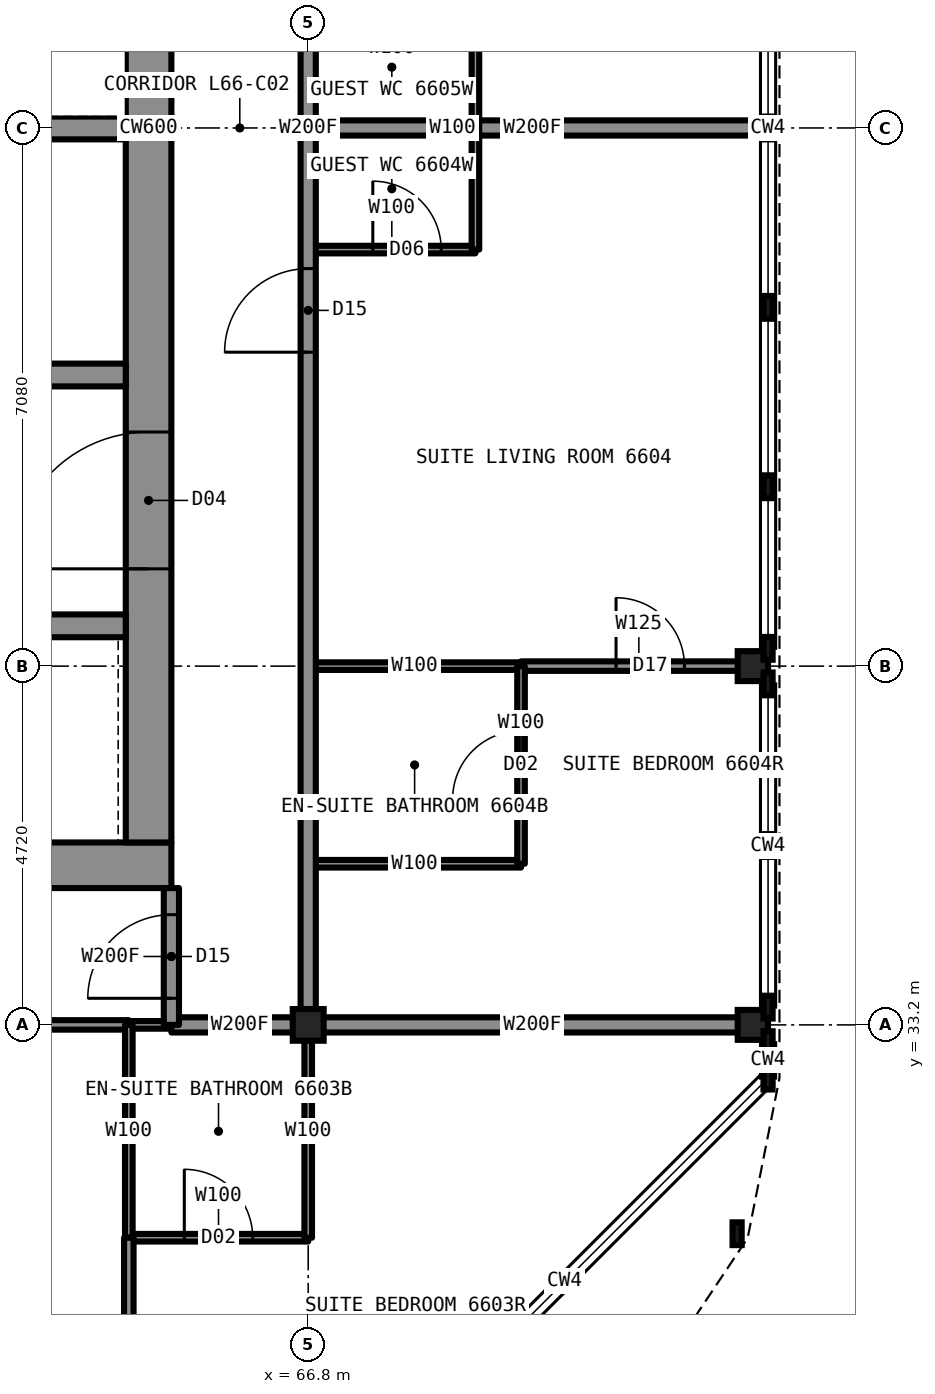
"""IFC4 building model, lengths in metres.
Left out: names, types, materials, properties, quantities, classifications, styles, units other than length and angle.
Written with IfcOpenShell. Run it as: python <this file> out.ifc"""

import sys

from ifc_helpers import new_model, si_unit, direction, frame, frame_2d, origin, origin_2d, place, context, subcontext, project, spatial, rectangle, i_section, extrude, element, fill, save


model = new_model("IFC4")
c1 = context("Model", 3, precision=1e-05, world=origin(), true_north=direction((0.0, 1.0)))
c2 = subcontext(c1, "Body", "Model", "MODEL_VIEW")
j1 = project(units=[si_unit("LENGTHUNIT", "METRE"), si_unit("PLANEANGLEUNIT", "RADIAN")], contexts=[c1])
p1 = place(None, origin())
s1 = spatial("IfcSite", under=j1, at=p1, CompositionType="ELEMENT")
p2 = place(p1, origin())
s2 = spatial("IfcBuilding", under=s1, at=p2, CompositionType="ELEMENT")
p3 = place(p2, frame((0.0, 0.0, 237.2)))
s3 = spatial("IfcBuildingStorey", under=s2, at=p3, CompositionType="ELEMENT", Elevation=237.2)
for number, where, z_axis, x_axis in (
    (1, (72.65, 33.2, 0.0), (0.0, 0.0, 1.0), (1.0, 0.0, 0.0)),
    (2, (72.65, 37.92, 0.0), (0.0, 0.0, 1.0), (1.0, 0.0, 0.0)),
):
    element("IfcColumn", number, at=place(p3, frame(where, z_axis=z_axis, x_axis=x_axis)), inside=s3, PredefinedType="COLUMN", context=c2, shape_type="SweptSolid", body=[
        extrude(i_section(OverallWidth=0.399, OverallDepth=0.394, WebThickness=0.023, FlangeThickness=0.037, at=origin_2d()), origin(), (0.0, 0.0, 1.0), 3.5),
    ])
p4 = place(p3, frame((66.8, 33.2, 0.0), z_axis=(0.0, 0.0, 1.0), x_axis=(1.0, 0.0, 0.0)))
e3 = element("IfcColumn", 3, at=p4, inside=s3, PredefinedType="COLUMN", context=c2, shape_type="SweptSolid", body=[
    extrude(i_section(OverallWidth=0.406, OverallDepth=0.417, WebThickness=0.03, FlangeThickness=0.048, at=origin_2d()), origin(), (0.0, 0.0, 1.0), 3.5),
])
p5 = place(p3, frame((45.0, 35.3, 0.0), z_axis=(0.0, 0.0, 1.0), x_axis=(1.0, 0.0, 0.0)))
e4 = element("IfcWall", 4, at=p5, inside=s3, PredefinedType="SHEAR", context=c2, shape_type="SweptSolid", body=[
    extrude(rectangle(XDim=20.0, YDim=0.6, at=frame_2d((10.0, 0.0))), origin(), (0.0, 0.0, 1.0), 3.5),
])
p6 = place(p3, frame((64.7, 35.6, 0.0), z_axis=(0.0, 0.0, 1.0), x_axis=(0.0, 1.0, 0.0)))
e5 = element("IfcWall", 5, at=p6, inside=s3, PredefinedType="SHEAR", context=c2, shape_type="SweptSolid", body=[
    extrude(rectangle(XDim=18.8, YDim=0.6, at=frame_2d((9.4, 0.0))), origin(), (0.0, 0.0, 1.0), 3.5),
])
p7 = place(p6, frame((13.4, 0.0, 0.0)))
e6 = element("IfcOpeningElement", 6, at=p7, cuts=e5, PredefinedType="OPENING", context=c2, shape_type="SweptSolid", body=[
    extrude(rectangle(XDim=1.8, YDim=2.2, at=frame_2d((0.9, 1.1))), frame((0.0, 0.31, 0.0), z_axis=(0.0, -1.0, 0.0), x_axis=(1.0, 0.0, 0.0)), (0.0, 0.0, 1.0), 0.62),
])
p8 = place(p6, frame((3.6, 0.0, 0.0)))
e7 = element("IfcOpeningElement", 7, at=p8, cuts=e5, PredefinedType="OPENING", context=c2, shape_type="SweptSolid", body=[
    extrude(rectangle(XDim=1.8, YDim=2.2, at=frame_2d((0.9, 1.1))), frame((0.0, 0.31, 0.0), z_axis=(0.0, -1.0, 0.0), x_axis=(1.0, 0.0, 0.0)), (0.0, 0.0, 1.0), 0.62),
])
p9 = place(p3, frame((45.6, 38.45, 0.0), z_axis=(0.0, 0.0, 1.0), x_axis=(1.0, 0.0, 0.0)))
e8 = element("IfcWall", 8, at=p9, inside=s3, PredefinedType="SHEAR", context=c2, shape_type="SweptSolid", body=[
    extrude(rectangle(XDim=18.8, YDim=0.3, at=frame_2d((9.4, 0.0))), origin(), (0.0, 0.0, 1.0), 3.5),
])
p10 = place(p9, frame((0.7, 0.0, 0.0)))
e9 = element("IfcOpeningElement", 9, at=p10, cuts=e8, PredefinedType="OPENING", context=c2, shape_type="SweptSolid", body=[
    extrude(rectangle(XDim=1.1, YDim=2.2, at=frame_2d((0.55, 1.1))), frame((0.0, 0.16, 0.0), z_axis=(0.0, -1.0, 0.0), x_axis=(1.0, 0.0, 0.0)), (0.0, 0.0, 1.0), 0.32),
])
p11 = place(p9, frame((3.4, 0.0, 0.0)))
e10 = element("IfcOpeningElement", 10, at=p11, cuts=e8, PredefinedType="OPENING", context=c2, shape_type="SweptSolid", body=[
    extrude(rectangle(XDim=1.1, YDim=2.2, at=frame_2d((0.55, 1.1))), frame((0.0, 0.16, 0.0), z_axis=(0.0, -1.0, 0.0), x_axis=(1.0, 0.0, 0.0)), (0.0, 0.0, 1.0), 0.32),
])
p12 = place(p9, frame((6.1, 0.0, 0.0)))
e11 = element("IfcOpeningElement", 11, at=p12, cuts=e8, PredefinedType="OPENING", context=c2, shape_type="SweptSolid", body=[
    extrude(rectangle(XDim=1.1, YDim=2.2, at=frame_2d((0.55, 1.1))), frame((0.0, 0.16, 0.0), z_axis=(0.0, -1.0, 0.0), x_axis=(1.0, 0.0, 0.0)), (0.0, 0.0, 1.0), 0.32),
])
p13 = place(p9, frame((8.8, 0.0, 0.0)))
e12 = element("IfcOpeningElement", 12, at=p13, cuts=e8, PredefinedType="OPENING", context=c2, shape_type="SweptSolid", body=[
    extrude(rectangle(XDim=1.1, YDim=2.2, at=frame_2d((0.55, 1.1))), frame((0.0, 0.16, 0.0), z_axis=(0.0, -1.0, 0.0), x_axis=(1.0, 0.0, 0.0)), (0.0, 0.0, 1.0), 0.32),
])
p14 = place(p3, frame((56.2, 41.75, 0.0), z_axis=(0.0, 0.0, 1.0), x_axis=(1.0, 0.0, 0.0)))
e13 = element("IfcWall", 13, at=p14, inside=s3, PredefinedType="SHEAR", context=c2, shape_type="SweptSolid", body=[
    extrude(rectangle(XDim=8.2, YDim=0.3, at=frame_2d((4.1, 0.0))), origin(), (0.0, 0.0, 1.0), 3.5),
])
p15 = place(p14, frame((3.3, 0.0, 0.0)))
e14 = element("IfcOpeningElement", 14, at=p15, cuts=e13, PredefinedType="OPENING", context=c2, shape_type="SweptSolid", body=[
    extrude(rectangle(XDim=1.0, YDim=2.1, at=frame_2d((0.5, 1.05))), frame((0.0, 0.16, 0.0), z_axis=(0.0, -1.0, 0.0), x_axis=(1.0, 0.0, 0.0)), (0.0, 0.0, 1.0), 0.32),
])
p16 = place(p3, frame((56.5, 45.0, 0.0), z_axis=(0.0, 0.0, 1.0), x_axis=(1.0, 0.0, 0.0)))
e15 = element("IfcWall", 15, at=p16, inside=s3, PredefinedType="SHEAR", context=c2, shape_type="SweptSolid", body=[
    extrude(rectangle(XDim=7.9, YDim=0.3, at=frame_2d((3.95, 0.0))), origin(), (0.0, 0.0, 1.0), 3.5),
])
p17 = place(p3, frame((66.8, 43.4, 0.0), z_axis=(0.0, 0.0, 1.0), x_axis=(1.0, 0.0, 0.0)))
e16 = element("IfcWall", 16, at=p17, inside=s3, PredefinedType="PARTITIONING", context=c2, shape_type="SweptSolid", body=[
    extrude(rectangle(XDim=2.2, YDim=0.1, at=frame_2d((1.1, 0.0))), origin(), (0.0, 0.0, 1.0), 3.33),
])
p18 = place(p17, frame((0.85, 0.0, 0.0)))
e17 = element("IfcOpeningElement", 17, at=p18, cuts=e16, PredefinedType="OPENING", context=c2, shape_type="SweptSolid", body=[
    extrude(rectangle(XDim=0.9, YDim=2.1, at=frame_2d((0.45, 1.05))), frame((0.0, 0.06, 0.0), z_axis=(0.0, -1.0, 0.0), x_axis=(1.0, 0.0, 0.0)), (0.0, 0.0, 1.0), 0.12),
])
p19 = place(p3, frame((64.44, 33.2, 0.0), z_axis=(0.0, 0.0, 1.0), x_axis=(1.0, 0.0, 0.0)))
e18 = element("IfcWall", 18, at=p19, inside=s3, PredefinedType="PARTITIONING", context=c2, shape_type="SweptSolid", body=[
    extrude(rectangle(XDim=0.56, YDim=0.1, at=frame_2d((0.28, 0.0))), origin(), (0.0, 0.0, 1.0), 3.33),
])
p20 = place(p3, frame((65.0, 33.2, 0.0), z_axis=(0.0, 0.0, 1.0), x_axis=(1.0, 0.0, 0.0)))
e19 = element("IfcWall", 19, at=p20, inside=s3, PredefinedType="PARTITIONING", context=c2, shape_type="SweptSolid", body=[
    extrude(rectangle(XDim=1.8, YDim=0.2, at=frame_2d((0.9, 0.0))), origin(), (0.0, 0.0, 1.0), 3.33),
])
p21 = place(p3, frame((66.8, 33.2, 0.0), z_axis=(0.0, 0.0, 1.0), x_axis=(1.0, 0.0, 0.0)))
e20 = element("IfcWall", 20, at=p21, inside=s3, PredefinedType="PARTITIONING", context=c2, shape_type="SweptSolid", body=[
    extrude(rectangle(XDim=5.9, YDim=0.2, at=frame_2d((2.95, 0.0))), origin(), (0.0, 0.0, 1.0), 2.573),
])
p22 = place(p3, frame((56.6, 33.2, 0.0), z_axis=(0.0, 0.0, 1.0), x_axis=(1.0, 0.0, 0.0)))
e21 = element("IfcWall", 21, at=p22, inside=s3, PredefinedType="PARTITIONING", context=c2, shape_type="SweptSolid", body=[
    extrude(rectangle(XDim=7.84, YDim=0.125, at=frame_2d((3.92, 0.0))), origin(), (0.0, 0.0, 1.0), 3.33),
])
p23 = place(p22, frame((3.45, 0.0, 0.0)))
e22 = element("IfcOpeningElement", 22, at=p23, cuts=e21, PredefinedType="OPENING", context=c2, shape_type="SweptSolid", body=[
    extrude(rectangle(XDim=0.9, YDim=2.2, at=frame_2d((0.45, 1.1))), frame((0.0, 0.073, 0.0), z_axis=(0.0, -1.0, 0.0), x_axis=(1.0, 0.0, 0.0)), (0.0, 0.0, 1.0), 0.145),
])
p24 = place(p3, frame((64.44, 30.4, 0.0), z_axis=(0.0, 0.0, 1.0), x_axis=(1.0, 0.0, 0.0)))
e23 = element("IfcWall", 23, at=p24, inside=s3, PredefinedType="PARTITIONING", context=c2, shape_type="SweptSolid", body=[
    extrude(rectangle(XDim=2.36, YDim=0.1, at=frame_2d((1.18, 0.0))), origin(), (0.0, 0.0, 1.0), 3.33),
])
p25 = place(p24, frame((0.73, 0.0, 0.0)))
e24 = element("IfcOpeningElement", 24, at=p25, cuts=e23, PredefinedType="OPENING", context=c2, shape_type="SweptSolid", body=[
    extrude(rectangle(XDim=0.9, YDim=2.1, at=frame_2d((0.45, 1.05))), frame((0.0, 0.06, 0.0), z_axis=(0.0, -1.0, 0.0), x_axis=(1.0, 0.0, 0.0)), (0.0, 0.0, 1.0), 0.12),
])
p26 = place(p3, frame((66.8, 37.92, 0.0), z_axis=(0.0, 0.0, 1.0), x_axis=(1.0, 0.0, 0.0)))
e25 = element("IfcWall", 25, at=p26, inside=s3, PredefinedType="PARTITIONING", context=c2, shape_type="SweptSolid", body=[
    extrude(rectangle(XDim=2.8, YDim=0.1, at=frame_2d((1.4, 0.0))), origin(), (0.0, 0.0, 1.0), 2.573),
])
p27 = place(p3, frame((69.6, 37.92, 0.0), z_axis=(0.0, 0.0, 1.0), x_axis=(1.0, 0.0, 0.0)))
e26 = element("IfcWall", 26, at=p27, inside=s3, PredefinedType="PARTITIONING", context=c2, shape_type="SweptSolid", body=[
    extrude(rectangle(XDim=3.1, YDim=0.125, at=frame_2d((1.55, 0.0))), origin(), (0.0, 0.0, 1.0), 2.573),
])
p28 = place(p27, frame((1.25, 0.0, 0.0)))
e27 = element("IfcOpeningElement", 27, at=p28, cuts=e26, PredefinedType="OPENING", context=c2, shape_type="SweptSolid", body=[
    extrude(rectangle(XDim=0.9, YDim=2.2, at=frame_2d((0.45, 1.1))), frame((0.0, 0.073, 0.0), z_axis=(0.0, -1.0, 0.0), x_axis=(1.0, 0.0, 0.0)), (0.0, 0.0, 1.0), 0.145),
])
p29 = place(p3, frame((66.8, 35.32, 0.0), z_axis=(0.0, 0.0, 1.0), x_axis=(1.0, 0.0, 0.0)))
e28 = element("IfcWall", 28, at=p29, inside=s3, PredefinedType="PARTITIONING", context=c2, shape_type="SweptSolid", body=[
    extrude(rectangle(XDim=2.8, YDim=0.1, at=frame_2d((1.4, 0.0))), origin(), (0.0, 0.0, 1.0), 3.33),
])
p30 = place(p3, frame((66.8, 45.0, 0.0), z_axis=(0.0, 0.0, 1.0), x_axis=(1.0, 0.0, 0.0)))
e29 = element("IfcWall", 29, at=p30, inside=s3, PredefinedType="PARTITIONING", context=c2, shape_type="SweptSolid", body=[
    extrude(rectangle(XDim=5.9, YDim=0.2, at=frame_2d((2.95, 0.0))), origin(), (0.0, 0.0, 1.0), 2.797),
])
p31 = place(p3, frame((65.0, 33.2, 0.0), z_axis=(0.0, 0.0, 1.0), x_axis=(0.0, 1.0, 0.0)))
e30 = element("IfcWall", 30, at=p31, inside=s3, PredefinedType="PARTITIONING", context=c2, shape_type="SweptSolid", body=[
    extrude(rectangle(XDim=1.8, YDim=0.2, at=frame_2d((0.9, 0.0))), origin(), (0.0, 0.0, 1.0), 3.33),
])
p32 = place(p31, frame((0.35, 0.0, 0.0)))
e31 = element("IfcOpeningElement", 31, at=p32, cuts=e30, PredefinedType="OPENING", context=c2, shape_type="SweptSolid", body=[
    extrude(rectangle(XDim=1.1, YDim=2.2, at=frame_2d((0.55, 1.1))), frame((0.0, 0.11, 0.0), z_axis=(0.0, -1.0, 0.0), x_axis=(1.0, 0.0, 0.0)), (0.0, 0.0, 1.0), 0.22),
])
p33 = place(p3, frame((66.8, 30.4, 0.0), z_axis=(0.0, 0.0, 1.0), x_axis=(0.0, 1.0, 0.0)))
e32 = element("IfcWall", 32, at=p33, inside=s3, PredefinedType="PARTITIONING", context=c2, shape_type="SweptSolid", body=[
    extrude(rectangle(XDim=2.8, YDim=0.1, at=frame_2d((1.4, 0.0))), origin(), (0.0, 0.0, 1.0), 2.573),
])
p34 = place(p3, frame((66.8, 33.2, 0.0), z_axis=(0.0, 0.0, 1.0), x_axis=(0.0, 1.0, 0.0)))
e33 = element("IfcWall", 33, at=p34, inside=s3, PredefinedType="PARTITIONING", context=c2, shape_type="SweptSolid", body=[
    extrude(rectangle(XDim=23.6, YDim=0.2, at=frame_2d((11.8, 0.0))), origin(), (0.0, 0.0, 1.0), 3.33),
])
p35 = place(p34, frame((8.85, 0.0, 0.0)))
e34 = element("IfcOpeningElement", 34, at=p35, cuts=e33, PredefinedType="OPENING", context=c2, shape_type="SweptSolid", body=[
    extrude(rectangle(XDim=1.1, YDim=2.2, at=frame_2d((0.55, 1.1))), frame((0.0, 0.11, 0.0), z_axis=(0.0, -1.0, 0.0), x_axis=(1.0, 0.0, 0.0)), (0.0, 0.0, 1.0), 0.22),
])
p36 = place(p34, frame((13.65, 0.0, 0.0)))
e35 = element("IfcOpeningElement", 35, at=p36, cuts=e33, PredefinedType="OPENING", context=c2, shape_type="SweptSolid", body=[
    extrude(rectangle(XDim=1.1, YDim=2.2, at=frame_2d((0.55, 1.1))), frame((0.0, 0.11, 0.0), z_axis=(0.0, -1.0, 0.0), x_axis=(1.0, 0.0, 0.0)), (0.0, 0.0, 1.0), 0.22),
])
p37 = place(p3, frame((69.0, 43.4, 0.0), z_axis=(0.0, 0.0, 1.0), x_axis=(0.0, 1.0, 0.0)))
e36 = element("IfcWall", 36, at=p37, inside=s3, PredefinedType="PARTITIONING", context=c2, shape_type="SweptSolid", body=[
    extrude(rectangle(XDim=3.2, YDim=0.1, at=frame_2d((1.6, 0.0))), origin(), (0.0, 0.0, 1.0), 3.33),
])
p38 = place(p3, frame((69.6, 35.32, 0.0), z_axis=(0.0, 0.0, 1.0), x_axis=(0.0, 1.0, 0.0)))
e37 = element("IfcWall", 37, at=p38, inside=s3, PredefinedType="PARTITIONING", context=c2, shape_type="SweptSolid", body=[
    extrude(rectangle(XDim=2.6, YDim=0.1, at=frame_2d((1.3, 0.0))), origin(), (0.0, 0.0, 1.0), 3.33),
])
p39 = place(p38, frame((0.85, 0.0, 0.0)))
e38 = element("IfcOpeningElement", 38, at=p39, cuts=e37, PredefinedType="OPENING", context=c2, shape_type="SweptSolid", body=[
    extrude(rectangle(XDim=0.9, YDim=2.1, at=frame_2d((0.45, 1.05))), frame((0.0, 0.06, 0.0), z_axis=(0.0, -1.0, 0.0), x_axis=(1.0, 0.0, 0.0)), (0.0, 0.0, 1.0), 0.12),
])
p40 = place(p3, frame((64.44, 30.4, 0.0), z_axis=(0.0, 0.0, 1.0), x_axis=(0.0, 1.0, 0.0)))
e39 = element("IfcWall", 39, at=p40, inside=s3, PredefinedType="PARTITIONING", context=c2, shape_type="SweptSolid", body=[
    extrude(rectangle(XDim=2.8, YDim=0.1, at=frame_2d((1.4, 0.0))), origin(), (0.0, 0.0, 1.0), 3.33),
])
p41 = place(p3, frame((64.44, 27.3, 0.0), z_axis=(0.0, 0.0, 1.0), x_axis=(0.0, 1.0, 0.0)))
e40 = element("IfcWall", 40, at=p41, inside=s3, PredefinedType="PARTITIONING", context=c2, shape_type="SweptSolid", body=[
    extrude(rectangle(XDim=3.1, YDim=0.125, at=frame_2d((1.55, 0.0))), origin(), (0.0, 0.0, 1.0), 3.33),
])
p42 = place(p41, frame((0.95, 0.0, 0.0)))
e41 = element("IfcOpeningElement", 41, at=p42, cuts=e40, PredefinedType="OPENING", context=c2, shape_type="SweptSolid", body=[
    extrude(rectangle(XDim=0.9, YDim=2.2, at=frame_2d((0.45, 1.1))), frame((0.0, 0.073, 0.0), z_axis=(0.0, -1.0, 0.0), x_axis=(1.0, 0.0, 0.0)), (0.0, 0.0, 1.0), 0.145),
])
p43 = place(p25, origin())
e42 = element("IfcDoor", 42, at=p43, inside=s3, OperationType="SINGLE_SWING_RIGHT", PredefinedType="DOOR", context=c2, shape_type="SweptSolid", body=[
    extrude(rectangle(XDim=0.9, YDim=2.1, at=frame_2d((0.45, 1.05))), frame((0.0, 0.025, 0.0), z_axis=(0.0, -1.0, 0.0), x_axis=(1.0, 0.0, 0.0)), (0.0, 0.0, 1.0), 0.05),
])
fill(e24, e42)
p44 = place(p32, origin())
e43 = element("IfcDoor", 43, at=p44, inside=s3, OperationType="SINGLE_SWING_LEFT", PredefinedType="DOOR", context=c2, shape_type="SweptSolid", body=[
    extrude(rectangle(XDim=1.1, YDim=2.2, at=frame_2d((0.55, 1.1))), frame((0.0, 0.025, 0.0), z_axis=(0.0, -1.0, 0.0), x_axis=(1.0, 0.0, 0.0)), (0.0, 0.0, 1.0), 0.05),
])
fill(e31, e43)
p45 = place(p35, origin())
e44 = element("IfcDoor", 44, at=p45, inside=s3, OperationType="SINGLE_SWING_LEFT", PredefinedType="DOOR", context=c2, shape_type="SweptSolid", body=[
    extrude(rectangle(XDim=1.1, YDim=2.2, at=frame_2d((0.55, 1.1))), frame((0.0, 0.025, 0.0), z_axis=(0.0, -1.0, 0.0), x_axis=(1.0, 0.0, 0.0)), (0.0, 0.0, 1.0), 0.05),
])
fill(e34, e44)
p46 = place(p39, origin())
e45 = element("IfcDoor", 45, at=p46, inside=s3, OperationType="SINGLE_SWING_RIGHT", PredefinedType="DOOR", context=c2, shape_type="SweptSolid", body=[
    extrude(rectangle(XDim=0.9, YDim=2.1, at=frame_2d((0.45, 1.05))), frame((0.0, 0.025, 0.0), z_axis=(0.0, -1.0, 0.0), x_axis=(1.0, 0.0, 0.0)), (0.0, 0.0, 1.0), 0.05),
])
fill(e38, e45)
p47 = place(p28, origin())
e46 = element("IfcDoor", 46, at=p47, inside=s3, OperationType="SINGLE_SWING_LEFT", PredefinedType="DOOR", context=c2, shape_type="SweptSolid", body=[
    extrude(rectangle(XDim=0.9, YDim=2.2, at=frame_2d((0.45, 1.1))), frame((0.0, 0.025, 0.0), z_axis=(0.0, -1.0, 0.0), x_axis=(1.0, 0.0, 0.0)), (0.0, 0.0, 1.0), 0.05),
])
fill(e27, e46)
p48 = place(p18, origin())
e47 = element("IfcDoor", 47, at=p48, inside=s3, OperationType="SINGLE_SWING_LEFT", PredefinedType="DOOR", context=c2, shape_type="SweptSolid", body=[
    extrude(rectangle(XDim=0.9, YDim=2.1, at=frame_2d((0.45, 1.05))), frame((0.0, 0.025, 0.0), z_axis=(0.0, -1.0, 0.0), x_axis=(1.0, 0.0, 0.0)), (0.0, 0.0, 1.0), 0.05),
])
fill(e17, e47)
p49 = place(p8, origin())
e48 = element("IfcDoor", 48, at=p49, inside=s3, OperationType="DOUBLE_DOOR_SINGLE_SWING", PredefinedType="DOOR", context=c2, shape_type="SweptSolid", body=[
    extrude(rectangle(XDim=1.8, YDim=2.2, at=frame_2d((0.9, 1.1))), frame((0.0, 0.025, 0.0), z_axis=(0.0, -1.0, 0.0), x_axis=(1.0, 0.0, 0.0)), (0.0, 0.0, 1.0), 0.05),
])
fill(e7, e48)
save(model, sys.argv[1])
